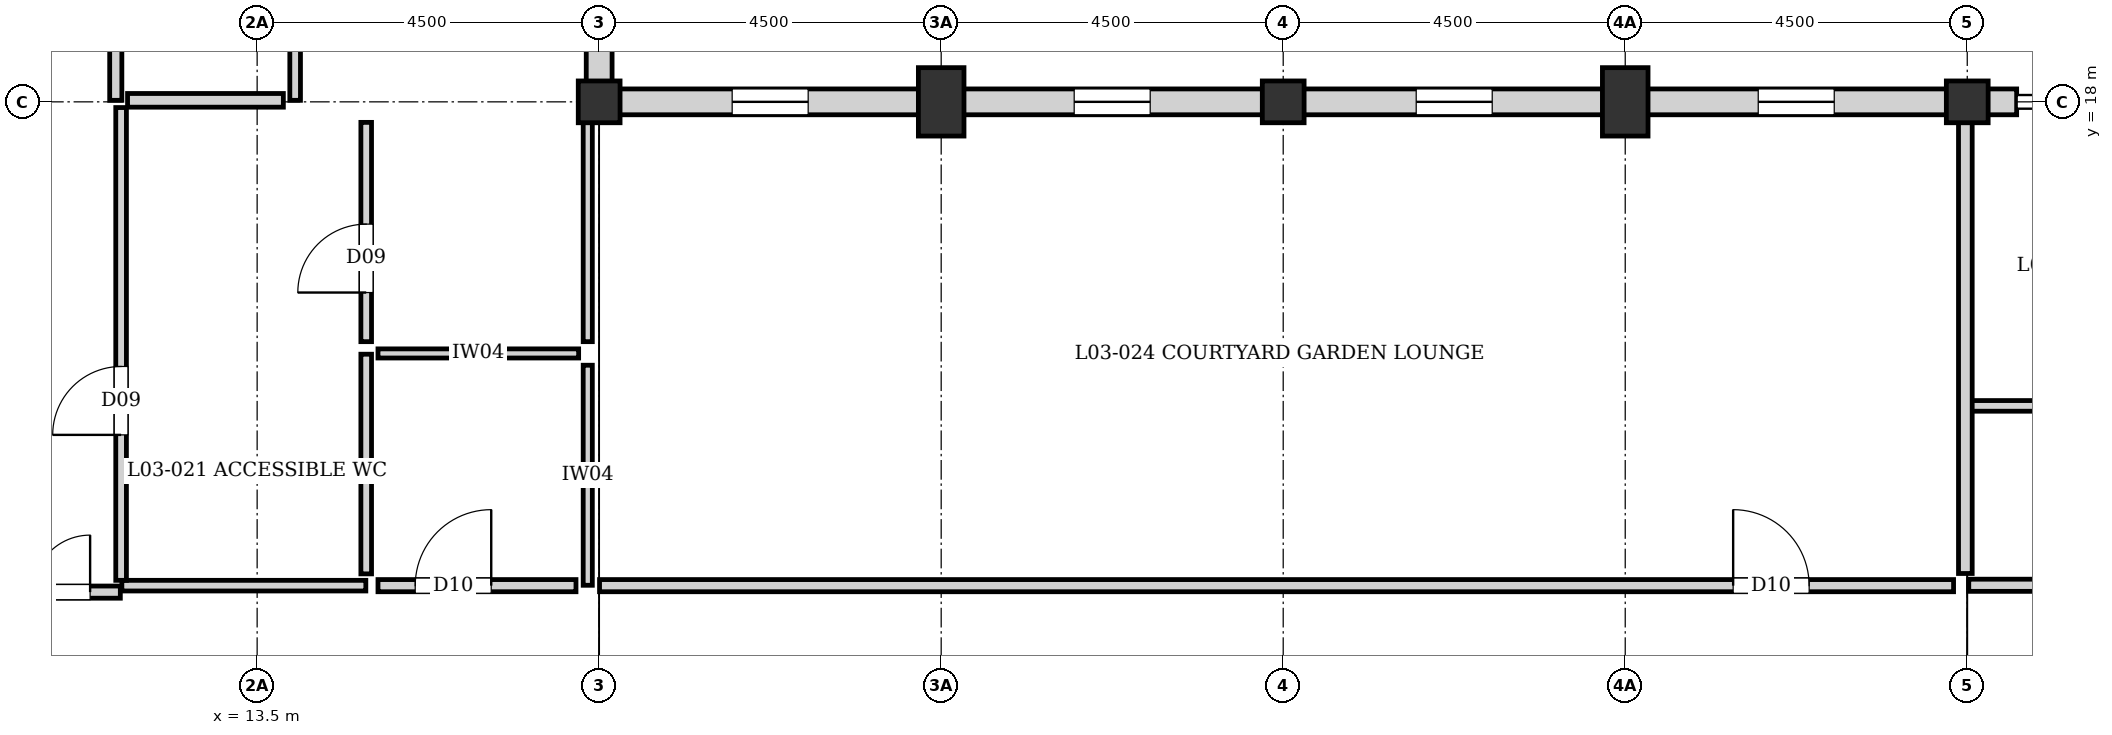
"""IFC4 building model, lengths in metres.
Left out: names, types, materials, properties, quantities, classifications, styles, units other than length and angle.
Written with IfcOpenShell. Run it as: python <this file> out.ifc"""

import sys

from ifc_helpers import new_model, si_unit, direction, frame, frame_2d, origin, origin_2d, place, context, subcontext, project, spatial, rectangle, extrude, element, fill, save


model = new_model("IFC4")
c1 = context("Model", 3, precision=1e-05, world=origin(), true_north=direction((0.0, 1.0)))
c2 = subcontext(c1, "Body", "Model", "MODEL_VIEW")
j1 = project(units=[si_unit("LENGTHUNIT", "METRE"), si_unit("PLANEANGLEUNIT", "RADIAN")], contexts=[c1])
p1 = place(None, origin())
s1 = spatial("IfcSite", under=j1, at=p1, CompositionType="ELEMENT")
p2 = place(p1, origin())
s2 = spatial("IfcBuilding", under=s1, at=p2, CompositionType="ELEMENT")
p3 = place(p2, frame((0.0, 0.0, 11.52)))
s3 = spatial("IfcBuildingStorey", under=s2, at=p3, CompositionType="ELEMENT", Elevation=11.52)
for number, where, z_axis, x_axis in (
    (1, (18.0, 18.0, 0.0), (0.0, 0.0, 1.0), (1.0, 0.0, 0.0)),
    (2, (27.0, 18.0, 0.0), (0.0, 0.0, 1.0), (1.0, 0.0, 0.0)),
    (3, (36.0, 18.0, 0.0), (0.0, 0.0, 1.0), (1.0, 0.0, 0.0)),
):
    element("IfcColumn", number, at=place(p3, frame(where, z_axis=z_axis, x_axis=x_axis)), inside=s3, PredefinedType="COLUMN", context=c2, shape_type="SweptSolid", body=[
        extrude(rectangle(XDim=0.55, YDim=0.55, at=origin_2d()), origin(), (0.0, 0.0, 1.0), 3.04),
    ])
for number, where, z_axis, x_axis in (
    (4, (22.5, 18.0, 0.0), (0.0, 0.0, 1.0), (1.0, 0.0, 0.0)),
    (5, (31.5, 18.0, 0.0), (0.0, 0.0, 1.0), (1.0, 0.0, 0.0)),
):
    element("IfcColumn", number, at=place(p3, frame(where, z_axis=z_axis, x_axis=x_axis)), inside=s3, PredefinedType="PILASTER", context=c2, shape_type="SweptSolid", body=[
        extrude(rectangle(XDim=0.6, YDim=0.9, at=origin_2d()), origin(), (0.0, 0.0, 1.0), 3.04),
    ])
p4 = place(p3, frame((18.0, 27.0, 0.0), z_axis=(0.0, 0.0, 1.0), x_axis=(0.0, -1.0, 0.0)))
e6 = element("IfcWall", 6, at=p4, inside=s3, PredefinedType="SOLIDWALL", context=c2, shape_type="SweptSolid", body=[
    extrude(rectangle(XDim=8.845, YDim=0.34, at=frame_2d((4.422, 0.0))), origin(), (0.0, 0.0, 1.0), 2.82),
])
p5 = place(p4, frame((1.75, 0.0, 0.35)))
e7 = element("IfcOpeningElement", 7, at=p5, cuts=e6, PredefinedType="OPENING", context=c2, shape_type="SweptSolid", body=[
    extrude(rectangle(XDim=1.0, YDim=1.6, at=frame_2d((0.5, 0.8))), frame((0.0, 0.18, 0.0), z_axis=(0.0, -1.0, 0.0), x_axis=(1.0, 0.0, 0.0)), (0.0, 0.0, 1.0), 0.36),
])
p6 = place(p4, frame((6.25, 0.0, 0.35)))
e8 = element("IfcOpeningElement", 8, at=p6, cuts=e6, PredefinedType="OPENING", context=c2, shape_type="SweptSolid", body=[
    extrude(rectangle(XDim=1.0, YDim=1.6, at=frame_2d((0.5, 0.8))), frame((0.0, 0.18, 0.0), z_axis=(0.0, -1.0, 0.0), x_axis=(1.0, 0.0, 0.0)), (0.0, 0.0, 1.0), 0.36),
])
p7 = place(p3, frame((18.0, 18.0, 0.0), z_axis=(0.0, 0.0, 1.0), x_axis=(1.0, 0.0, 0.0)))
e9 = element("IfcWall", 9, at=p7, inside=s3, PredefinedType="SOLIDWALL", context=c2, shape_type="SweptSolid", body=[
    extrude(rectangle(XDim=9.0, YDim=0.34, at=frame_2d((4.5, 0.0))), origin(), (0.0, 0.0, 1.0), 2.38),
])
p8 = place(p7, frame((1.75, 0.0, 0.35)))
e10 = element("IfcOpeningElement", 10, at=p8, cuts=e9, PredefinedType="OPENING", context=c2, shape_type="SweptSolid", body=[
    extrude(rectangle(XDim=1.0, YDim=1.6, at=frame_2d((0.5, 0.8))), frame((0.0, 0.18, 0.0), z_axis=(0.0, -1.0, 0.0), x_axis=(1.0, 0.0, 0.0)), (0.0, 0.0, 1.0), 0.36),
])
p9 = place(p7, frame((6.25, 0.0, 0.35)))
e11 = element("IfcOpeningElement", 11, at=p9, cuts=e9, PredefinedType="OPENING", context=c2, shape_type="SweptSolid", body=[
    extrude(rectangle(XDim=1.0, YDim=1.6, at=frame_2d((0.5, 0.8))), frame((0.0, 0.18, 0.0), z_axis=(0.0, -1.0, 0.0), x_axis=(1.0, 0.0, 0.0)), (0.0, 0.0, 1.0), 0.36),
])
p10 = place(p3, frame((27.0, 18.0, 0.0), z_axis=(0.0, 0.0, 1.0), x_axis=(1.0, 0.0, 0.0)))
e12 = element("IfcWall", 12, at=p10, inside=s3, PredefinedType="SOLIDWALL", context=c2, shape_type="SweptSolid", body=[
    extrude(rectangle(XDim=9.0, YDim=0.34, at=frame_2d((4.5, 0.0))), origin(), (0.0, 0.0, 1.0), 2.55),
])
p11 = place(p10, frame((1.75, 0.0, 0.35)))
e13 = element("IfcOpeningElement", 13, at=p11, cuts=e12, PredefinedType="OPENING", context=c2, shape_type="SweptSolid", body=[
    extrude(rectangle(XDim=1.0, YDim=1.6, at=frame_2d((0.5, 0.8))), frame((0.0, 0.18, 0.0), z_axis=(0.0, -1.0, 0.0), x_axis=(1.0, 0.0, 0.0)), (0.0, 0.0, 1.0), 0.36),
])
p12 = place(p10, frame((6.25, 0.0, 0.35)))
e14 = element("IfcOpeningElement", 14, at=p12, cuts=e12, PredefinedType="OPENING", context=c2, shape_type="SweptSolid", body=[
    extrude(rectangle(XDim=1.0, YDim=1.6, at=frame_2d((0.5, 0.8))), frame((0.0, 0.18, 0.0), z_axis=(0.0, -1.0, 0.0), x_axis=(1.0, 0.0, 0.0)), (0.0, 0.0, 1.0), 0.36),
])
p13 = place(p3, frame((36.0, 18.0, 0.0), z_axis=(0.0, 0.0, 1.0), x_axis=(1.0, 0.0, 0.0)))
e15 = element("IfcWall", 15, at=p13, inside=s3, PredefinedType="SOLIDWALL", context=c2, shape_type="SweptSolid", body=[
    extrude(rectangle(XDim=0.65, YDim=0.34, at=frame_2d((0.325, 0.0))), origin(), (0.0, 0.0, 1.0), 2.48),
])
p14 = place(p3, frame((36.02, 11.64, 0.0), z_axis=(0.0, 0.0, 1.0), x_axis=(1.0, 0.0, 0.0)))
e16 = element("IfcWall", 16, at=p14, inside=s3, PredefinedType="PARTITIONING", context=c2, shape_type="SweptSolid", body=[
    extrude(rectangle(XDim=2.06, YDim=0.16, at=frame_2d((1.03, 0.0))), origin(), (0.0, 0.0, 1.0), 2.82),
])
p15 = place(p3, frame((36.02, 14.0, 0.0), z_axis=(0.0, 0.0, 1.0), x_axis=(1.0, 0.0, 0.0)))
e17 = element("IfcWall", 17, at=p15, inside=s3, PredefinedType="PLUMBINGWALL", context=c2, shape_type="SweptSolid", body=[
    extrude(rectangle(XDim=2.06, YDim=0.14, at=frame_2d((1.03, 0.0))), origin(), (0.0, 0.0, 1.0), 2.82),
])
p16 = place(p3, frame((11.64, 18.02, 0.0), z_axis=(0.0, 0.0, 1.0), x_axis=(0.0, 1.0, 0.0)))
e18 = element("IfcWall", 18, at=p16, inside=s3, PredefinedType="PARTITIONING", context=c2, shape_type="SweptSolid", body=[
    extrude(rectangle(XDim=2.06, YDim=0.16, at=frame_2d((1.03, 0.0))), origin(), (0.0, 0.0, 1.0), 2.82),
])
p17 = place(p3, frame((14.0, 18.02, 0.0), z_axis=(0.0, 0.0, 1.0), x_axis=(0.0, 1.0, 0.0)))
e19 = element("IfcWall", 19, at=p17, inside=s3, PredefinedType="PLUMBINGWALL", context=c2, shape_type="SweptSolid", body=[
    extrude(rectangle(XDim=2.06, YDim=0.14, at=frame_2d((1.03, 0.0))), origin(), (0.0, 0.0, 1.0), 2.82),
])
p18 = place(p3, frame((35.975, 11.795, 0.0), z_axis=(0.0, 0.0, 1.0), x_axis=(0.0, 1.0, 0.0)))
e20 = element("IfcWall", 20, at=p18, inside=s3, PredefinedType="PARTITIONING", context=c2, shape_type="SweptSolid", body=[
    extrude(rectangle(XDim=6.03, YDim=0.18, at=frame_2d((3.015, 0.0))), origin(), (0.0, 0.0, 1.0), 2.34),
])
p19 = place(p3, frame((11.795, 18.02, 0.0), z_axis=(0.0, 0.0, 1.0), x_axis=(1.0, 0.0, 0.0)))
e21 = element("IfcWall", 21, at=p19, inside=s3, PredefinedType="PARTITIONING", context=c2, shape_type="SweptSolid", body=[
    extrude(rectangle(XDim=2.05, YDim=0.18, at=frame_2d((1.025, 0.0))), origin(), (0.0, 0.0, 1.0), 2.42),
])
p20 = place(p3, frame((11.72, 11.635, 0.0), z_axis=(0.0, 0.0, 1.0), x_axis=(1.0, 0.0, 0.0)))
e22 = element("IfcWall", 22, at=p20, inside=s3, PredefinedType="PLUMBINGWALL", context=c2, shape_type="SweptSolid", body=[
    extrude(rectangle(XDim=3.21, YDim=0.14, at=frame_2d((1.605, 0.0))), origin(), (0.0, 0.0, 1.0), 2.82),
])
p21 = place(p3, frame((14.935, 11.79, 0.0), z_axis=(0.0, 0.0, 1.0), x_axis=(0.0, 1.0, 0.0)))
e23 = element("IfcWall", 23, at=p21, inside=s3, PredefinedType="PLUMBINGWALL", context=c2, shape_type="SweptSolid", body=[
    extrude(rectangle(XDim=2.89, YDim=0.14, at=frame_2d((1.445, 0.0))), origin(), (0.0, 0.0, 1.0), 2.82),
])
p22 = place(p3, frame((15.09, 14.69, 0.0), z_axis=(0.0, 0.0, 1.0), x_axis=(1.0, 0.0, 0.0)))
e24 = element("IfcWall", 24, at=p22, inside=s3, PredefinedType="PARTITIONING", context=c2, shape_type="SweptSolid", body=[
    extrude(rectangle(XDim=2.64, YDim=0.12, at=frame_2d((1.32, 0.0))), origin(), (0.0, 0.0, 1.0), 2.82),
])
p23 = place(p3, frame((17.85, 11.64, 0.0), z_axis=(0.0, 0.0, 1.0), x_axis=(0.0, 1.0, 0.0)))
e25 = element("IfcWall", 25, at=p23, inside=s3, PredefinedType="PARTITIONING", context=c2, shape_type="SweptSolid", body=[
    extrude(rectangle(XDim=2.895, YDim=0.12, at=frame_2d((1.448, 0.0))), origin(), (0.0, 0.0, 1.0), 2.38),
])
p24 = place(p3, frame((17.85, 14.845, 0.0), z_axis=(0.0, 0.0, 1.0), x_axis=(0.0, 1.0, 0.0)))
e26 = element("IfcWall", 26, at=p24, inside=s3, PredefinedType="PARTITIONING", context=c2, shape_type="SweptSolid", body=[
    extrude(rectangle(XDim=2.98, YDim=0.12, at=frame_2d((1.49, 0.0))), origin(), (0.0, 0.0, 1.0), 2.38),
])
p25 = place(p3, frame((9.405, 11.55, 0.0), z_axis=(0.0, 0.0, 1.0), x_axis=(1.0, 0.0, 0.0)))
e27 = element("IfcWall", 27, at=p25, inside=s3, PredefinedType="PARTITIONING", context=c2, shape_type="SweptSolid", body=[
    extrude(rectangle(XDim=2.295, YDim=0.16, at=frame_2d((1.147, 0.0))), origin(), (0.0, 0.0, 1.0), 2.82),
])
p26 = place(p25, frame((0.397, 0.0, 0.0)))
e28 = element("IfcOpeningElement", 28, at=p26, cuts=e27, PredefinedType="OPENING", context=c2, shape_type="SweptSolid", body=[
    extrude(rectangle(XDim=1.5, YDim=2.1, at=frame_2d((0.75, 1.05))), frame((0.0, 0.09, 0.0), z_axis=(0.0, -1.0, 0.0), x_axis=(1.0, 0.0, 0.0)), (0.0, 0.0, 1.0), 0.18),
])
p27 = place(p3, frame((15.09, 11.635, 0.0), z_axis=(0.0, 0.0, 1.0), x_axis=(1.0, 0.0, 0.0)))
e29 = element("IfcWall", 29, at=p27, inside=s3, PredefinedType="PARTITIONING", context=c2, shape_type="SweptSolid", body=[
    extrude(rectangle(XDim=2.605, YDim=0.16, at=frame_2d((1.302, 0.0))), origin(), (0.0, 0.0, 1.0), 2.82),
])
p28 = place(p27, frame((0.49, 0.0, 0.0)))
e30 = element("IfcOpeningElement", 30, at=p28, cuts=e29, PredefinedType="OPENING", context=c2, shape_type="SweptSolid", body=[
    extrude(rectangle(XDim=1.0, YDim=2.1, at=frame_2d((0.5, 1.05))), frame((0.0, 0.09, 0.0), z_axis=(0.0, -1.0, 0.0), x_axis=(1.0, 0.0, 0.0)), (0.0, 0.0, 1.0), 0.18),
])
p29 = place(p3, frame((18.005, 11.635, 0.0), z_axis=(0.0, 0.0, 1.0), x_axis=(1.0, 0.0, 0.0)))
e31 = element("IfcWall", 31, at=p29, inside=s3, PredefinedType="PARTITIONING", context=c2, shape_type="SweptSolid", body=[
    extrude(rectangle(XDim=17.815, YDim=0.16, at=frame_2d((8.908, 0.0))), origin(), (0.0, 0.0, 1.0), 2.82),
])
p30 = place(p29, frame((14.915, 0.0, 0.0)))
e32 = element("IfcOpeningElement", 32, at=p30, cuts=e31, PredefinedType="OPENING", context=c2, shape_type="SweptSolid", body=[
    extrude(rectangle(XDim=1.0, YDim=2.1, at=frame_2d((0.5, 1.05))), frame((0.0, 0.09, 0.0), z_axis=(0.0, -1.0, 0.0), x_axis=(1.0, 0.0, 0.0)), (0.0, 0.0, 1.0), 0.18),
])
p31 = place(p3, frame((11.71, 11.705, 0.0), z_axis=(0.0, 0.0, 1.0), x_axis=(0.0, 1.0, 0.0)))
e33 = element("IfcWall", 33, at=p31, inside=s3, PredefinedType="PLUMBINGWALL", context=c2, shape_type="SweptSolid", body=[
    extrude(rectangle(XDim=6.22, YDim=0.14, at=frame_2d((3.11, 0.0))), origin(), (0.0, 0.0, 1.0), 2.82),
])
p32 = place(p31, frame((1.914, 0.0, 0.0)))
e34 = element("IfcOpeningElement", 34, at=p32, cuts=e33, PredefinedType="OPENING", context=c2, shape_type="SweptSolid", body=[
    extrude(rectangle(XDim=0.9, YDim=2.1, at=frame_2d((0.45, 1.05))), frame((0.0, 0.08, 0.0), z_axis=(0.0, -1.0, 0.0), x_axis=(1.0, 0.0, 0.0)), (0.0, 0.0, 1.0), 0.16),
])
p33 = place(p3, frame((14.935, 14.845, 0.0), z_axis=(0.0, 0.0, 1.0), x_axis=(0.0, 1.0, 0.0)))
e35 = element("IfcWall", 35, at=p33, inside=s3, PredefinedType="PLUMBINGWALL", context=c2, shape_type="SweptSolid", body=[
    extrude(rectangle(XDim=2.885, YDim=0.14, at=frame_2d((1.442, 0.0))), origin(), (0.0, 0.0, 1.0), 2.82),
])
p34 = place(p33, frame((0.646, 0.0, 0.0)))
e36 = element("IfcOpeningElement", 36, at=p34, cuts=e35, PredefinedType="OPENING", context=c2, shape_type="SweptSolid", body=[
    extrude(rectangle(XDim=0.9, YDim=2.1, at=frame_2d((0.45, 1.05))), frame((0.0, 0.08, 0.0), z_axis=(0.0, -1.0, 0.0), x_axis=(1.0, 0.0, 0.0)), (0.0, 0.0, 1.0), 0.16),
])
p35 = place(p8, origin())
e37 = element("IfcWindow", 37, at=p35, inside=s3, PartitioningType="SINGLE_PANEL", PredefinedType="WINDOW", context=c2, shape_type="SweptSolid", body=[
    extrude(rectangle(XDim=1.0, YDim=1.6, at=frame_2d((0.5, 0.8))), frame((0.0, 0.03, 0.0), z_axis=(0.0, -1.0, 0.0), x_axis=(1.0, 0.0, 0.0)), (0.0, 0.0, 1.0), 0.06),
])
fill(e10, e37)
p36 = place(p9, origin())
e38 = element("IfcWindow", 38, at=p36, inside=s3, PartitioningType="SINGLE_PANEL", PredefinedType="WINDOW", context=c2, shape_type="SweptSolid", body=[
    extrude(rectangle(XDim=1.0, YDim=1.6, at=frame_2d((0.5, 0.8))), frame((0.0, 0.03, 0.0), z_axis=(0.0, -1.0, 0.0), x_axis=(1.0, 0.0, 0.0)), (0.0, 0.0, 1.0), 0.06),
])
fill(e11, e38)
p37 = place(p11, origin())
e39 = element("IfcWindow", 39, at=p37, inside=s3, PartitioningType="SINGLE_PANEL", PredefinedType="WINDOW", context=c2, shape_type="SweptSolid", body=[
    extrude(rectangle(XDim=1.0, YDim=1.6, at=frame_2d((0.5, 0.8))), frame((0.0, 0.03, 0.0), z_axis=(0.0, -1.0, 0.0), x_axis=(1.0, 0.0, 0.0)), (0.0, 0.0, 1.0), 0.06),
])
fill(e13, e39)
p38 = place(p12, origin())
e40 = element("IfcWindow", 40, at=p38, inside=s3, PartitioningType="SINGLE_PANEL", PredefinedType="WINDOW", context=c2, shape_type="SweptSolid", body=[
    extrude(rectangle(XDim=1.0, YDim=1.6, at=frame_2d((0.5, 0.8))), frame((0.0, 0.03, 0.0), z_axis=(0.0, -1.0, 0.0), x_axis=(1.0, 0.0, 0.0)), (0.0, 0.0, 1.0), 0.06),
])
fill(e14, e40)
p39 = place(p26, origin())
e41 = element("IfcDoor", 41, at=p39, inside=s3, OperationType="DOUBLE_DOOR_SINGLE_SWING", PredefinedType="DOOR", context=c2, shape_type="SweptSolid", body=[
    extrude(rectangle(XDim=1.5, YDim=2.1, at=frame_2d((0.75, 1.05))), frame((0.0, 0.025, 0.0), z_axis=(0.0, -1.0, 0.0), x_axis=(1.0, 0.0, 0.0)), (0.0, 0.0, 1.0), 0.05),
])
fill(e28, e41)
p40 = place(p28, origin())
e42 = element("IfcDoor", 42, at=p40, inside=s3, OperationType="SINGLE_SWING_RIGHT", PredefinedType="DOOR", context=c2, shape_type="SweptSolid", body=[
    extrude(rectangle(XDim=1.0, YDim=2.1, at=frame_2d((0.5, 1.05))), frame((0.0, 0.025, 0.0), z_axis=(0.0, -1.0, 0.0), x_axis=(1.0, 0.0, 0.0)), (0.0, 0.0, 1.0), 0.05),
])
fill(e30, e42)
p41 = place(p30, origin())
e43 = element("IfcDoor", 43, at=p41, inside=s3, OperationType="SINGLE_SWING_LEFT", PredefinedType="DOOR", context=c2, shape_type="SweptSolid", body=[
    extrude(rectangle(XDim=1.0, YDim=2.1, at=frame_2d((0.5, 1.05))), frame((0.0, 0.025, 0.0), z_axis=(0.0, -1.0, 0.0), x_axis=(1.0, 0.0, 0.0)), (0.0, 0.0, 1.0), 0.05),
])
fill(e32, e43)
p42 = place(p32, origin())
e44 = element("IfcDoor", 44, at=p42, inside=s3, OperationType="SINGLE_SWING_LEFT", PredefinedType="DOOR", context=c2, shape_type="SweptSolid", body=[
    extrude(rectangle(XDim=0.9, YDim=2.1, at=frame_2d((0.45, 1.05))), frame((0.0, 0.025, 0.0), z_axis=(0.0, -1.0, 0.0), x_axis=(1.0, 0.0, 0.0)), (0.0, 0.0, 1.0), 0.05),
])
fill(e34, e44)
p43 = place(p34, origin())
e45 = element("IfcDoor", 45, at=p43, inside=s3, OperationType="SINGLE_SWING_LEFT", PredefinedType="DOOR", context=c2, shape_type="SweptSolid", body=[
    extrude(rectangle(XDim=0.9, YDim=2.1, at=frame_2d((0.45, 1.05))), frame((0.0, 0.025, 0.0), z_axis=(0.0, -1.0, 0.0), x_axis=(1.0, 0.0, 0.0)), (0.0, 0.0, 1.0), 0.05),
])
fill(e36, e45)
save(model, sys.argv[1])
